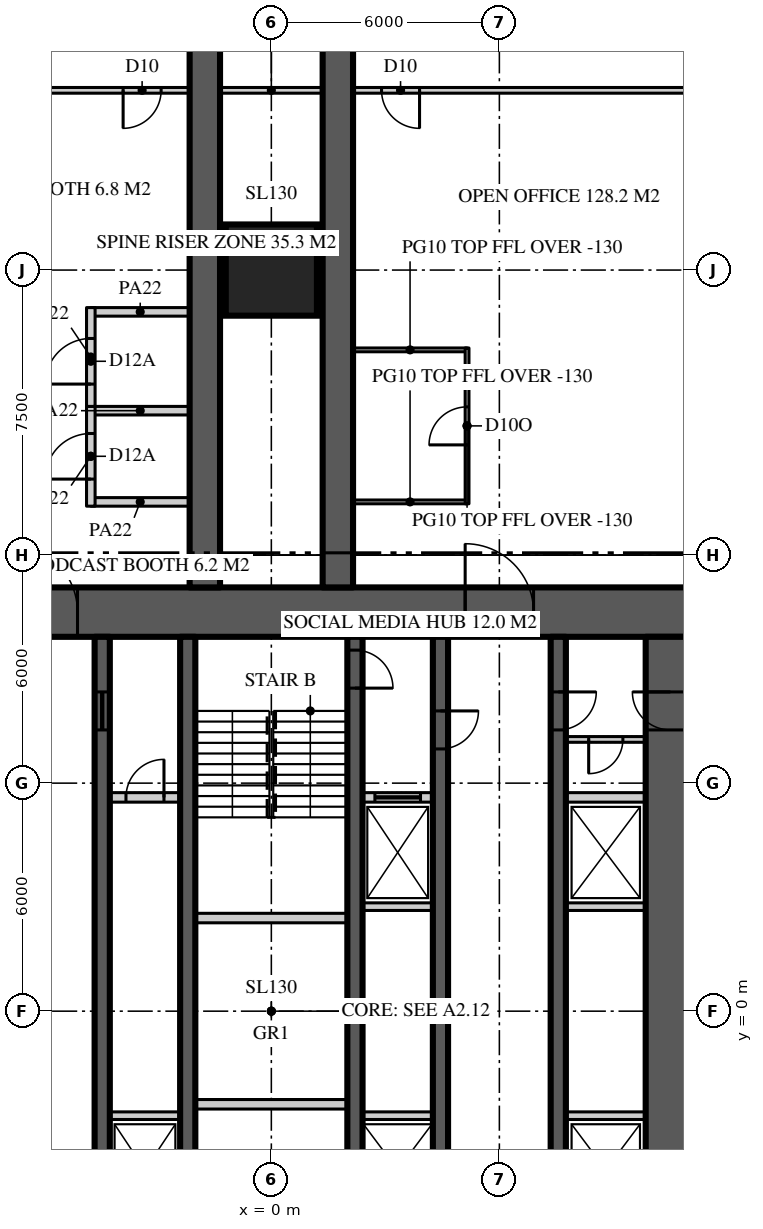
"""IFC4 building model, lengths in metres.
Left out: names, types, materials, properties, quantities, classifications, styles, units other than length and angle.
Written with IfcOpenShell. Run it as: python <this file> out.ifc"""

import sys

from ifc_helpers import new_model, si_unit, direction, frame, frame_2d, origin, origin_2d, place, context, subcontext, project, spatial, rectangle, extrude, element, fill, save


model = new_model("IFC4")
c1 = context("Model", 3, precision=1e-05, world=origin(), true_north=direction((0.0, 1.0)))
c2 = subcontext(c1, "Body", "Model", "MODEL_VIEW")
j1 = project(units=[si_unit("LENGTHUNIT", "METRE"), si_unit("PLANEANGLEUNIT", "RADIAN")], contexts=[c1])
p1 = place(None, origin())
s1 = spatial("IfcSite", under=j1, at=p1, CompositionType="ELEMENT")
p2 = place(p1, origin())
s2 = spatial("IfcBuilding", under=s1, at=p2, CompositionType="ELEMENT")
p3 = place(p2, frame((0.0, 0.0, 70.8)))
s3 = spatial("IfcBuildingStorey", under=s2, at=p3, CompositionType="ELEMENT", Elevation=70.8)
p4 = place(p3, frame((-11.15, 10.5, 0.0), z_axis=(0.0, 0.0, 1.0), x_axis=(1.0, 0.0, 0.0)))
e1 = element("IfcWall", 1, at=p4, inside=s3, PredefinedType="SHEAR", context=c2, shape_type="SweptSolid", body=[
    extrude(rectangle(XDim=22.3, YDim=1.3, at=frame_2d((11.15, 0.0))), origin(), (0.0, 0.0, 1.0), 3.9),
])
p5 = place(p4, frame((4.25, 0.0, 0.0)))
e2 = element("IfcOpeningElement", 2, at=p5, cuts=e1, PredefinedType="OPENING", context=c2, shape_type="SweptSolid", body=[
    extrude(rectangle(XDim=1.8, YDim=2.2, at=frame_2d((0.9, 1.1))), frame((0.0, 0.66, 0.0), z_axis=(0.0, -1.0, 0.0), x_axis=(1.0, 0.0, 0.0)), (0.0, 0.0, 1.0), 1.32),
])
p6 = place(p4, frame((16.25, 0.0, 0.0)))
e3 = element("IfcOpeningElement", 3, at=p6, cuts=e1, PredefinedType="OPENING", context=c2, shape_type="SweptSolid", body=[
    extrude(rectangle(XDim=1.8, YDim=2.2, at=frame_2d((0.9, 1.1))), frame((0.0, 0.66, 0.0), z_axis=(0.0, -1.0, 0.0), x_axis=(1.0, 0.0, 0.0)), (0.0, 0.0, 1.0), 1.32),
])
p7 = place(p3, frame((10.5, -9.85, 0.0), z_axis=(0.0, 0.0, 1.0), x_axis=(0.0, 1.0, 0.0)))
e4 = element("IfcWall", 4, at=p7, inside=s3, PredefinedType="SHEAR", context=c2, shape_type="SweptSolid", body=[
    extrude(rectangle(XDim=19.7, YDim=1.3, at=frame_2d((9.85, 0.0))), origin(), (0.0, 0.0, 1.0), 3.9),
])
p8 = place(p7, frame((17.25, 0.0, 0.0)))
e5 = element("IfcOpeningElement", 5, at=p8, cuts=e4, PredefinedType="OPENING", context=c2, shape_type="SweptSolid", body=[
    extrude(rectangle(XDim=1.0, YDim=2.2, at=frame_2d((0.5, 1.1))), frame((0.0, 0.66, 0.0), z_axis=(0.0, -1.0, 0.0), x_axis=(1.0, 0.0, 0.0)), (0.0, 0.0, 1.0), 1.32),
])
for number, where, z_axis, x_axis in (
    (6, (1.75, 11.15, 0.0), (0.0, 0.0, 1.0), (0.0, 1.0, 0.0)),
    (7, (-1.75, 11.15, 0.0), (0.0, 0.0, 1.0), (0.0, 1.0, 0.0)),
):
    element("IfcWall", number, at=place(p3, frame(where, z_axis=z_axis, x_axis=x_axis)), inside=s3, PredefinedType="SHEAR", context=c2, shape_type="SweptSolid", body=[
        extrude(rectangle(XDim=15.25, YDim=0.8, at=frame_2d((7.625, 0.0))), origin(), (0.0, 0.0, 1.0), 3.9),
    ])
p9 = place(p3, frame((0.0, 19.5, 0.0), z_axis=(0.0, 0.0, 1.0), x_axis=(1.0, 0.0, 0.0)))
e8 = element("IfcColumn", 8, at=p9, inside=s3, PredefinedType="COLUMN", context=c2, shape_type="SweptSolid", body=[
    extrude(rectangle(XDim=2.4, YDim=2.4, at=origin_2d()), origin(), (0.0, 0.0, 1.0), 3.9),
])
p10 = place(p3, frame((7.55, 9.85, 0.0), z_axis=(0.0, 0.0, 1.0), x_axis=(0.0, -1.0, 0.0)))
e9 = element("IfcWall", 9, at=p10, inside=s3, PredefinedType="SHEAR", context=c2, shape_type="SweptSolid", body=[
    extrude(rectangle(XDim=19.7, YDim=0.4, at=frame_2d((9.85, 0.0))), origin(), (0.0, 0.0, 1.0), 3.9),
])
p11 = place(p10, frame((1.45, 0.0, 0.0)))
e10 = element("IfcOpeningElement", 10, at=p11, cuts=e9, PredefinedType="OPENING", context=c2, shape_type="SweptSolid", body=[
    extrude(rectangle(XDim=1.0, YDim=2.2, at=frame_2d((0.5, 1.1))), frame((0.0, 0.21, 0.0), z_axis=(0.0, -1.0, 0.0), x_axis=(1.0, 0.0, 0.0)), (0.0, 0.0, 1.0), 0.42),
])
p12 = place(p10, frame((17.3, 0.0, 0.0)))
e11 = element("IfcOpeningElement", 11, at=p12, cuts=e9, PredefinedType="OPENING", context=c2, shape_type="SweptSolid", body=[
    extrude(rectangle(XDim=0.9, YDim=2.1, at=frame_2d((0.45, 1.05))), frame((0.0, 0.21, 0.0), z_axis=(0.0, -1.0, 0.0), x_axis=(1.0, 0.0, 0.0)), (0.0, 0.0, 1.0), 0.42),
])
p13 = place(p3, frame((-4.45, -9.85, 0.0), z_axis=(0.0, 0.0, 1.0), x_axis=(0.0, 1.0, 0.0)))
e12 = element("IfcWall", 12, at=p13, inside=s3, PredefinedType="SHEAR", context=c2, shape_type="SweptSolid", body=[
    extrude(rectangle(XDim=19.7, YDim=0.4, at=frame_2d((9.85, 0.0))), origin(), (0.0, 0.0, 1.0), 3.9),
])
p14 = place(p13, frame((1.95, 0.0, 0.0)))
e13 = element("IfcOpeningElement", 13, at=p14, cuts=e12, PredefinedType="OPENING", context=c2, shape_type="SweptSolid", body=[
    extrude(rectangle(XDim=1.0, YDim=2.2, at=frame_2d((0.5, 1.1))), frame((0.0, 0.21, 0.0), z_axis=(0.0, -1.0, 0.0), x_axis=(1.0, 0.0, 0.0)), (0.0, 0.0, 1.0), 0.42),
])
p15 = place(p13, frame((17.25, 0.0, 0.0)))
e14 = element("IfcOpeningElement", 14, at=p15, cuts=e12, PredefinedType="OPENING", context=c2, shape_type="SweptSolid", body=[
    extrude(rectangle(XDim=1.0, YDim=2.1, at=frame_2d((0.5, 1.05))), frame((0.0, 0.21, 0.0), z_axis=(0.0, -1.0, 0.0), x_axis=(1.0, 0.0, 0.0)), (0.0, 0.0, 1.0), 0.42),
])
p16 = place(p3, frame((4.45, 9.85, 0.0), z_axis=(0.0, 0.0, 1.0), x_axis=(0.0, -1.0, 0.0)))
e15 = element("IfcWall", 15, at=p16, inside=s3, PredefinedType="SHEAR", context=c2, shape_type="SweptSolid", body=[
    extrude(rectangle(XDim=19.7, YDim=0.4, at=frame_2d((9.85, 0.0))), origin(), (0.0, 0.0, 1.0), 3.9),
])
p17 = place(p16, frame((1.95, 0.0, 0.0)))
e16 = element("IfcOpeningElement", 16, at=p17, cuts=e15, PredefinedType="OPENING", context=c2, shape_type="SweptSolid", body=[
    extrude(rectangle(XDim=1.0, YDim=2.2, at=frame_2d((0.5, 1.1))), frame((0.0, 0.21, 0.0), z_axis=(0.0, -1.0, 0.0), x_axis=(1.0, 0.0, 0.0)), (0.0, 0.0, 1.0), 0.42),
])
p18 = place(p16, frame((17.3, 0.0, 0.0)))
e17 = element("IfcOpeningElement", 17, at=p18, cuts=e15, PredefinedType="OPENING", context=c2, shape_type="SweptSolid", body=[
    extrude(rectangle(XDim=0.9, YDim=2.1, at=frame_2d((0.45, 1.05))), frame((0.0, 0.21, 0.0), z_axis=(0.0, -1.0, 0.0), x_axis=(1.0, 0.0, 0.0)), (0.0, 0.0, 1.0), 0.42),
])
p19 = place(p3, frame((-2.2, -9.85, 0.0), z_axis=(0.0, 0.0, 1.0), x_axis=(0.0, 1.0, 0.0)))
e18 = element("IfcWall", 18, at=p19, inside=s3, PredefinedType="SHEAR", context=c2, shape_type="SweptSolid", body=[
    extrude(rectangle(XDim=19.7, YDim=0.4, at=frame_2d((9.85, 0.0))), origin(), (0.0, 0.0, 1.0), 3.9),
])
p20 = place(p19, frame((0.35, 0.0, 0.0)))
e19 = element("IfcOpeningElement", 19, at=p20, cuts=e18, PredefinedType="OPENING", context=c2, shape_type="SweptSolid", body=[
    extrude(rectangle(XDim=1.0, YDim=2.2, at=frame_2d((0.5, 1.1))), frame((0.0, 0.21, 0.0), z_axis=(0.0, -1.0, 0.0), x_axis=(1.0, 0.0, 0.0)), (0.0, 0.0, 1.0), 0.42),
])
p21 = place(p3, frame((2.2, 9.85, 0.0), z_axis=(0.0, 0.0, 1.0), x_axis=(0.0, -1.0, 0.0)))
e20 = element("IfcWall", 20, at=p21, inside=s3, PredefinedType="SHEAR", context=c2, shape_type="SweptSolid", body=[
    extrude(rectangle(XDim=19.7, YDim=0.4, at=frame_2d((9.85, 0.0))), origin(), (0.0, 0.0, 1.0), 3.9),
])
p22 = place(p21, frame((0.35, 0.0, 0.0)))
e21 = element("IfcOpeningElement", 21, at=p22, cuts=e20, PredefinedType="OPENING", context=c2, shape_type="SweptSolid", body=[
    extrude(rectangle(XDim=1.0, YDim=2.2, at=frame_2d((0.5, 1.1))), frame((0.0, 0.21, 0.0), z_axis=(0.0, -1.0, 0.0), x_axis=(1.0, 0.0, 0.0)), (0.0, 0.0, 1.0), 0.42),
])
p23 = place(p3, frame((-4.25, 5.625, 0.0), z_axis=(0.0, 0.0, 1.0), x_axis=(1.0, 0.0, 0.0)))
e22 = element("IfcWall", 22, at=p23, inside=s3, PredefinedType="SOLIDWALL", context=c2, shape_type="SweptSolid", body=[
    extrude(rectangle(XDim=1.85, YDim=0.25, at=frame_2d((0.925, 0.0))), origin(), (0.0, 0.0, 1.0), 3.7),
])
p24 = place(p23, frame((0.425, 0.0, 0.0)))
e23 = element("IfcOpeningElement", 23, at=p24, cuts=e22, PredefinedType="OPENING", context=c2, shape_type="SweptSolid", body=[
    extrude(rectangle(XDim=1.0, YDim=2.2, at=frame_2d((0.5, 1.1))), frame((0.0, 0.135, 0.0), z_axis=(0.0, -1.0, 0.0), x_axis=(1.0, 0.0, 0.0)), (0.0, 0.0, 1.0), 0.27),
])
p25 = place(p3, frame((2.4, 5.625, 0.0), z_axis=(0.0, 0.0, 1.0), x_axis=(1.0, 0.0, 0.0)))
e24 = element("IfcWall", 24, at=p25, inside=s3, PredefinedType="SOLIDWALL", context=c2, shape_type="SweptSolid", body=[
    extrude(rectangle(XDim=1.85, YDim=0.25, at=frame_2d((0.925, 0.0))), origin(), (0.0, 0.0, 1.0), 3.7),
])
p26 = place(p25, frame((0.325, 0.0, 0.0)))
e25 = element("IfcOpeningElement", 25, at=p26, cuts=e24, PredefinedType="OPENING", context=c2, shape_type="SweptSolid", body=[
    extrude(rectangle(XDim=1.2, YDim=2.2, at=frame_2d((0.6, 1.1))), frame((0.0, 0.135, 0.0), z_axis=(0.0, -1.0, 0.0), x_axis=(1.0, 0.0, 0.0)), (0.0, 0.0, 1.0), 0.27),
])
p27 = place(p3, frame((7.75, 5.625, 0.0), z_axis=(0.0, 0.0, 1.0), x_axis=(1.0, 0.0, 0.0)))
e26 = element("IfcWall", 26, at=p27, inside=s3, PredefinedType="SOLIDWALL", context=c2, shape_type="SweptSolid", body=[
    extrude(rectangle(XDim=2.1, YDim=0.25, at=frame_2d((1.05, 0.0))), origin(), (0.0, 0.0, 1.0), 3.7),
])
for number, where, z_axis, x_axis in (
    (27, (-2.0, -2.45, 0.0), (0.0, 0.0, 1.0), (1.0, 0.0, 0.0)),
    (28, (-2.0, 2.45, 0.0), (0.0, 0.0, 1.0), (1.0, 0.0, 0.0)),
):
    element("IfcWall", number, at=place(p3, frame(where, z_axis=z_axis, x_axis=x_axis)), inside=s3, PredefinedType="SOLIDWALL", context=c2, shape_type="SweptSolid", body=[
        extrude(rectangle(XDim=4.0, YDim=0.25, at=frame_2d((2.0, 0.0))), origin(), (0.0, 0.0, 1.0), 3.7),
    ])
for number, where, z_axis, x_axis in (
    (29, (-4.25, -2.75, 0.0), (0.0, 0.0, 1.0), (1.0, 0.0, 0.0)),
    (30, (2.4, -2.75, 0.0), (0.0, 0.0, 1.0), (1.0, 0.0, 0.0)),
):
    element("IfcWall", number, at=place(p3, frame(where, z_axis=z_axis, x_axis=x_axis)), inside=s3, PredefinedType="SOLIDWALL", context=c2, shape_type="SweptSolid", body=[
        extrude(rectangle(XDim=1.85, YDim=0.2, at=frame_2d((0.925, 0.0))), origin(), (0.0, 0.0, 1.0), 3.7),
    ])
p28 = place(p3, frame((7.75, -2.75, 0.0), z_axis=(0.0, 0.0, 1.0), x_axis=(1.0, 0.0, 0.0)))
e31 = element("IfcWall", 31, at=p28, inside=s3, PredefinedType="SOLIDWALL", context=c2, shape_type="SweptSolid", body=[
    extrude(rectangle(XDim=2.1, YDim=0.2, at=frame_2d((1.05, 0.0))), origin(), (0.0, 0.0, 1.0), 3.7),
])
p29 = place(p3, frame((2.4, 2.75, 0.0), z_axis=(0.0, 0.0, 1.0), x_axis=(1.0, 0.0, 0.0)))
e32 = element("IfcWall", 32, at=p29, inside=s3, PredefinedType="SOLIDWALL", context=c2, shape_type="SweptSolid", body=[
    extrude(rectangle(XDim=1.85, YDim=0.2, at=frame_2d((0.925, 0.0))), origin(), (0.0, 0.0, 1.0), 3.7),
])
p30 = place(p3, frame((7.75, 2.75, 0.0), z_axis=(0.0, 0.0, 1.0), x_axis=(1.0, 0.0, 0.0)))
e33 = element("IfcWall", 33, at=p30, inside=s3, PredefinedType="SOLIDWALL", context=c2, shape_type="SweptSolid", body=[
    extrude(rectangle(XDim=2.1, YDim=0.2, at=frame_2d((1.05, 0.0))), origin(), (0.0, 0.0, 1.0), 3.7),
])
p31 = place(p3, frame((12.82, 24.229, 0.0), z_axis=(0.0, 0.0, 1.0), x_axis=(-1.0, 0.0, 0.0)))
e34 = element("IfcWall", 34, at=p31, inside=s3, PredefinedType="PARTITIONING", context=c2, shape_type="SweptSolid", body=[
    extrude(rectangle(XDim=25.64, YDim=0.15, at=frame_2d((12.82, 0.0))), origin(), (0.0, 0.0, 1.0), 3.77),
])
p32 = place(p31, frame((15.72, 0.0, 0.0)))
e35 = element("IfcOpeningElement", 35, at=p32, cuts=e34, PredefinedType="OPENING", context=c2, shape_type="SweptSolid", body=[
    extrude(rectangle(XDim=1.0, YDim=2.2, at=frame_2d((0.5, 1.1))), frame((0.0, 0.085, 0.0), z_axis=(0.0, -1.0, 0.0), x_axis=(1.0, 0.0, 0.0)), (0.0, 0.0, 1.0), 0.17),
])
p33 = place(p31, frame((8.92, 0.0, 0.0)))
e36 = element("IfcOpeningElement", 36, at=p33, cuts=e34, PredefinedType="OPENING", context=c2, shape_type="SweptSolid", body=[
    extrude(rectangle(XDim=1.0, YDim=2.2, at=frame_2d((0.5, 1.1))), frame((0.0, 0.085, 0.0), z_axis=(0.0, -1.0, 0.0), x_axis=(1.0, 0.0, 0.0)), (0.0, 0.0, 1.0), 0.17),
])
for number, where, z_axis, x_axis in (
    (37, (-2.15, 13.4, 0.0), (0.0, 0.0, 1.0), (-1.0, 0.0, 0.0)),
    (38, (-2.15, 15.8, 0.0), (0.0, 0.0, 1.0), (-1.0, 0.0, 0.0)),
):
    element("IfcWall", number, at=place(p3, frame(where, z_axis=z_axis, x_axis=x_axis)), inside=s3, PredefinedType="PARTITIONING", context=c2, shape_type="SweptSolid", body=[
        extrude(rectangle(XDim=2.6, YDim=0.225, at=frame_2d((1.3, 0.0))), origin(), (0.0, 0.0, 1.0), 3.77),
    ])
p34 = place(p3, frame((-4.75, 13.288, 0.0), z_axis=(0.0, 0.0, 1.0), x_axis=(0.0, 1.0, 0.0)))
e39 = element("IfcWall", 39, at=p34, inside=s3, PredefinedType="PARTITIONING", context=c2, shape_type="SweptSolid", body=[
    extrude(rectangle(XDim=2.625, YDim=0.225, at=frame_2d((1.312, 0.0))), origin(), (0.0, 0.0, 1.0), 3.77),
])
p35 = place(p34, frame((0.712, 0.0, 0.0)))
e40 = element("IfcOpeningElement", 40, at=p35, cuts=e39, PredefinedType="OPENING", context=c2, shape_type="SweptSolid", body=[
    extrude(rectangle(XDim=1.2, YDim=2.2, at=frame_2d((0.6, 1.1))), frame((0.0, 0.123, 0.0), z_axis=(0.0, -1.0, 0.0), x_axis=(1.0, 0.0, 0.0)), (0.0, 0.0, 1.0), 0.245),
])
p36 = place(p3, frame((-2.15, 18.4, 0.0), z_axis=(0.0, 0.0, 1.0), x_axis=(-1.0, 0.0, 0.0)))
e41 = element("IfcWall", 41, at=p36, inside=s3, PredefinedType="PARTITIONING", context=c2, shape_type="SweptSolid", body=[
    extrude(rectangle(XDim=2.6, YDim=0.225, at=frame_2d((1.3, 0.0))), origin(), (0.0, 0.0, 1.0), 3.77),
])
p37 = place(p3, frame((-4.75, 15.913, 0.0), z_axis=(0.0, 0.0, 1.0), x_axis=(0.0, 1.0, 0.0)))
e42 = element("IfcWall", 42, at=p37, inside=s3, PredefinedType="PARTITIONING", context=c2, shape_type="SweptSolid", body=[
    extrude(rectangle(XDim=2.6, YDim=0.225, at=frame_2d((1.3, 0.0))), origin(), (0.0, 0.0, 1.0), 3.77),
])
p38 = place(p37, frame((0.587, 0.0, 0.0)))
e43 = element("IfcOpeningElement", 43, at=p38, cuts=e42, PredefinedType="OPENING", context=c2, shape_type="SweptSolid", body=[
    extrude(rectangle(XDim=1.2, YDim=2.2, at=frame_2d((0.6, 1.1))), frame((0.0, 0.123, 0.0), z_axis=(0.0, -1.0, 0.0), x_axis=(1.0, 0.0, 0.0)), (0.0, 0.0, 1.0), 0.245),
])
for number, where, z_axis, x_axis in (
    (44, (2.15, 13.4, 0.0), (0.0, 0.0, 1.0), (1.0, 0.0, 0.0)),
    (45, (2.15, 17.4, 0.0), (0.0, 0.0, 1.0), (1.0, 0.0, 0.0)),
):
    element("IfcWall", number, at=place(p3, frame(where, z_axis=z_axis, x_axis=x_axis)), inside=s3, PredefinedType="PARTITIONING", context=c2, shape_type="SweptSolid", body=[
        extrude(rectangle(XDim=3.0, YDim=0.1, at=frame_2d((1.5, 0.0))), origin(), (0.0, 0.0, 1.0), 3.77),
    ])
p39 = place(p3, frame((5.15, 13.35, 0.0), z_axis=(0.0, 0.0, 1.0), x_axis=(0.0, 1.0, 0.0)))
e46 = element("IfcWall", 46, at=p39, inside=s3, PredefinedType="PARTITIONING", context=c2, shape_type="SweptSolid", body=[
    extrude(rectangle(XDim=4.1, YDim=0.1, at=frame_2d((2.05, 0.0))), origin(), (0.0, 0.0, 1.0), 3.77),
])
p40 = place(p39, frame((1.55, 0.0, 0.0)))
e47 = element("IfcOpeningElement", 47, at=p40, cuts=e46, PredefinedType="OPENING", context=c2, shape_type="SweptSolid", body=[
    extrude(rectangle(XDim=1.0, YDim=2.2, at=frame_2d((0.5, 1.1))), frame((0.0, 0.06, 0.0), z_axis=(0.0, -1.0, 0.0), x_axis=(1.0, 0.0, 0.0)), (0.0, 0.0, 1.0), 0.12),
])
p41 = place(p3, frame((9.85, 7.15, 0.0), z_axis=(0.0, 0.0, 1.0), x_axis=(-1.0, 0.0, 0.0)))
e48 = element("IfcWall", 48, at=p41, inside=s3, PredefinedType="SOLIDWALL", context=c2, shape_type="SweptSolid", body=[
    extrude(rectangle(XDim=2.1, YDim=0.15, at=frame_2d((1.05, 0.0))), origin(), (0.0, 0.0, 1.0), 3.77),
])
p42 = place(p41, frame((0.6, 0.0, 0.0)))
e49 = element("IfcOpeningElement", 49, at=p42, cuts=e48, PredefinedType="OPENING", context=c2, shape_type="SweptSolid", body=[
    extrude(rectangle(XDim=0.9, YDim=2.1, at=frame_2d((0.45, 1.05))), frame((0.0, 0.085, 0.0), z_axis=(0.0, -1.0, 0.0), x_axis=(1.0, 0.0, 0.0)), (0.0, 0.0, 1.0), 0.17),
])
p43 = place(p5, origin())
e50 = element("IfcDoor", 50, at=p43, inside=s3, OperationType="DOUBLE_DOOR_DOUBLE_SWING", PredefinedType="DOOR", context=c2, shape_type="SweptSolid", body=[
    extrude(rectangle(XDim=1.8, YDim=2.2, at=frame_2d((0.9, 1.1))), frame((0.0, 0.025, 0.0), z_axis=(0.0, -1.0, 0.0), x_axis=(1.0, 0.0, 0.0)), (0.0, 0.0, 1.0), 0.05),
])
fill(e2, e50)
p44 = place(p6, origin())
e51 = element("IfcDoor", 51, at=p44, inside=s3, OperationType="DOUBLE_DOOR_DOUBLE_SWING", PredefinedType="DOOR", context=c2, shape_type="SweptSolid", body=[
    extrude(rectangle(XDim=1.8, YDim=2.2, at=frame_2d((0.9, 1.1))), frame((0.0, 0.025, 0.0), z_axis=(0.0, -1.0, 0.0), x_axis=(1.0, 0.0, 0.0)), (0.0, 0.0, 1.0), 0.05),
])
fill(e3, e51)
p45 = place(p11, origin())
e52 = element("IfcDoor", 52, at=p45, inside=s3, OperationType="SINGLE_SWING_LEFT", PredefinedType="DOOR", context=c2, shape_type="SweptSolid", body=[
    extrude(rectangle(XDim=1.0, YDim=2.2, at=frame_2d((0.5, 1.1))), frame((0.0, 0.025, 0.0), z_axis=(0.0, -1.0, 0.0), x_axis=(1.0, 0.0, 0.0)), (0.0, 0.0, 1.0), 0.05),
])
fill(e10, e52)
p46 = place(p8, origin())
e53 = element("IfcDoor", 53, at=p46, inside=s3, OperationType="SINGLE_SWING_RIGHT", PredefinedType="DOOR", context=c2, shape_type="SweptSolid", body=[
    extrude(rectangle(XDim=1.0, YDim=2.2, at=frame_2d((0.5, 1.1))), frame((0.0, 0.025, 0.0), z_axis=(0.0, -1.0, 0.0), x_axis=(1.0, 0.0, 0.0)), (0.0, 0.0, 1.0), 0.05),
])
fill(e5, e53)
p47 = place(p17, origin())
e54 = element("IfcDoor", 54, at=p47, inside=s3, OperationType="SINGLE_SWING_LEFT", PredefinedType="DOOR", context=c2, shape_type="SweptSolid", body=[
    extrude(rectangle(XDim=1.0, YDim=2.2, at=frame_2d((0.5, 1.1))), frame((0.0, 0.025, 0.0), z_axis=(0.0, -1.0, 0.0), x_axis=(1.0, 0.0, 0.0)), (0.0, 0.0, 1.0), 0.05),
])
fill(e16, e54)
p48 = place(p22, origin())
e55 = element("IfcDoor", 55, at=p48, inside=s3, OperationType="SINGLE_SWING_RIGHT", PredefinedType="DOOR", context=c2, shape_type="SweptSolid", body=[
    extrude(rectangle(XDim=1.0, YDim=2.2, at=frame_2d((0.5, 1.1))), frame((0.0, 0.025, 0.0), z_axis=(0.0, -1.0, 0.0), x_axis=(1.0, 0.0, 0.0)), (0.0, 0.0, 1.0), 0.05),
])
fill(e21, e55)
p49 = place(p15, origin())
e56 = element("IfcDoor", 56, at=p49, inside=s3, OperationType="SLIDING_TO_LEFT", PredefinedType="DOOR", context=c2, shape_type="SweptSolid", body=[
    extrude(rectangle(XDim=1.0, YDim=2.1, at=frame_2d((0.5, 1.05))), frame((0.0, 0.025, 0.0), z_axis=(0.0, -1.0, 0.0), x_axis=(1.0, 0.0, 0.0)), (0.0, 0.0, 1.0), 0.05),
])
fill(e14, e56)
p50 = place(p26, origin())
e57 = element("IfcDoor", 57, at=p50, inside=s3, OperationType="SLIDING_TO_LEFT", PredefinedType="DOOR", context=c2, shape_type="SweptSolid", body=[
    extrude(rectangle(XDim=1.2, YDim=2.2, at=frame_2d((0.6, 1.1))), frame((0.0, 0.025, 0.0), z_axis=(0.0, -1.0, 0.0), x_axis=(1.0, 0.0, 0.0)), (0.0, 0.0, 1.0), 0.05),
])
fill(e25, e57)
p51 = place(p32, origin())
e58 = element("IfcDoor", 58, at=p51, inside=s3, OperationType="SINGLE_SWING_RIGHT", PredefinedType="DOOR", context=c2, shape_type="SweptSolid", body=[
    extrude(rectangle(XDim=1.0, YDim=2.2, at=frame_2d((0.5, 1.1))), frame((0.0, 0.025, 0.0), z_axis=(0.0, -1.0, 0.0), x_axis=(1.0, 0.0, 0.0)), (0.0, 0.0, 1.0), 0.05),
])
fill(e35, e58)
p52 = place(p33, origin())
e59 = element("IfcDoor", 59, at=p52, inside=s3, OperationType="SINGLE_SWING_LEFT", PredefinedType="DOOR", context=c2, shape_type="SweptSolid", body=[
    extrude(rectangle(XDim=1.0, YDim=2.2, at=frame_2d((0.5, 1.1))), frame((0.0, 0.025, 0.0), z_axis=(0.0, -1.0, 0.0), x_axis=(1.0, 0.0, 0.0)), (0.0, 0.0, 1.0), 0.05),
])
fill(e36, e59)
p53 = place(p35, origin())
e60 = element("IfcDoor", 60, at=p53, inside=s3, OperationType="SINGLE_SWING_LEFT", PredefinedType="DOOR", context=c2, shape_type="SweptSolid", body=[
    extrude(rectangle(XDim=1.2, YDim=2.2, at=frame_2d((0.6, 1.1))), frame((0.0, 0.025, 0.0), z_axis=(0.0, -1.0, 0.0), x_axis=(1.0, 0.0, 0.0)), (0.0, 0.0, 1.0), 0.05),
])
fill(e40, e60)
p54 = place(p38, origin())
e61 = element("IfcDoor", 61, at=p54, inside=s3, OperationType="SINGLE_SWING_LEFT", PredefinedType="DOOR", context=c2, shape_type="SweptSolid", body=[
    extrude(rectangle(XDim=1.2, YDim=2.2, at=frame_2d((0.6, 1.1))), frame((0.0, 0.025, 0.0), z_axis=(0.0, -1.0, 0.0), x_axis=(1.0, 0.0, 0.0)), (0.0, 0.0, 1.0), 0.05),
])
fill(e43, e61)
p55 = place(p40, origin())
e62 = element("IfcDoor", 62, at=p55, inside=s3, OperationType="SINGLE_SWING_LEFT", PredefinedType="DOOR", context=c2, shape_type="SweptSolid", body=[
    extrude(rectangle(XDim=1.0, YDim=2.2, at=frame_2d((0.5, 1.1))), frame((0.0, 0.025, 0.0), z_axis=(0.0, -1.0, 0.0), x_axis=(1.0, 0.0, 0.0)), (0.0, 0.0, 1.0), 0.05),
])
fill(e47, e62)
p56 = place(p24, origin())
e63 = element("IfcDoor", 63, at=p56, inside=s3, OperationType="SINGLE_SWING_RIGHT", PredefinedType="DOOR", context=c2, shape_type="SweptSolid", body=[
    extrude(rectangle(XDim=1.0, YDim=2.2, at=frame_2d((0.5, 1.1))), frame((0.0, 0.025, 0.0), z_axis=(0.0, -1.0, 0.0), x_axis=(1.0, 0.0, 0.0)), (0.0, 0.0, 1.0), 0.05),
])
fill(e23, e63)
p57 = place(p42, origin())
e64 = element("IfcDoor", 64, at=p57, inside=s3, OperationType="SINGLE_SWING_RIGHT", PredefinedType="DOOR", context=c2, shape_type="SweptSolid", body=[
    extrude(rectangle(XDim=0.9, YDim=2.1, at=frame_2d((0.45, 1.05))), frame((0.0, 0.025, 0.0), z_axis=(0.0, -1.0, 0.0), x_axis=(1.0, 0.0, 0.0)), (0.0, 0.0, 1.0), 0.05),
])
fill(e49, e64)
save(model, sys.argv[1])
